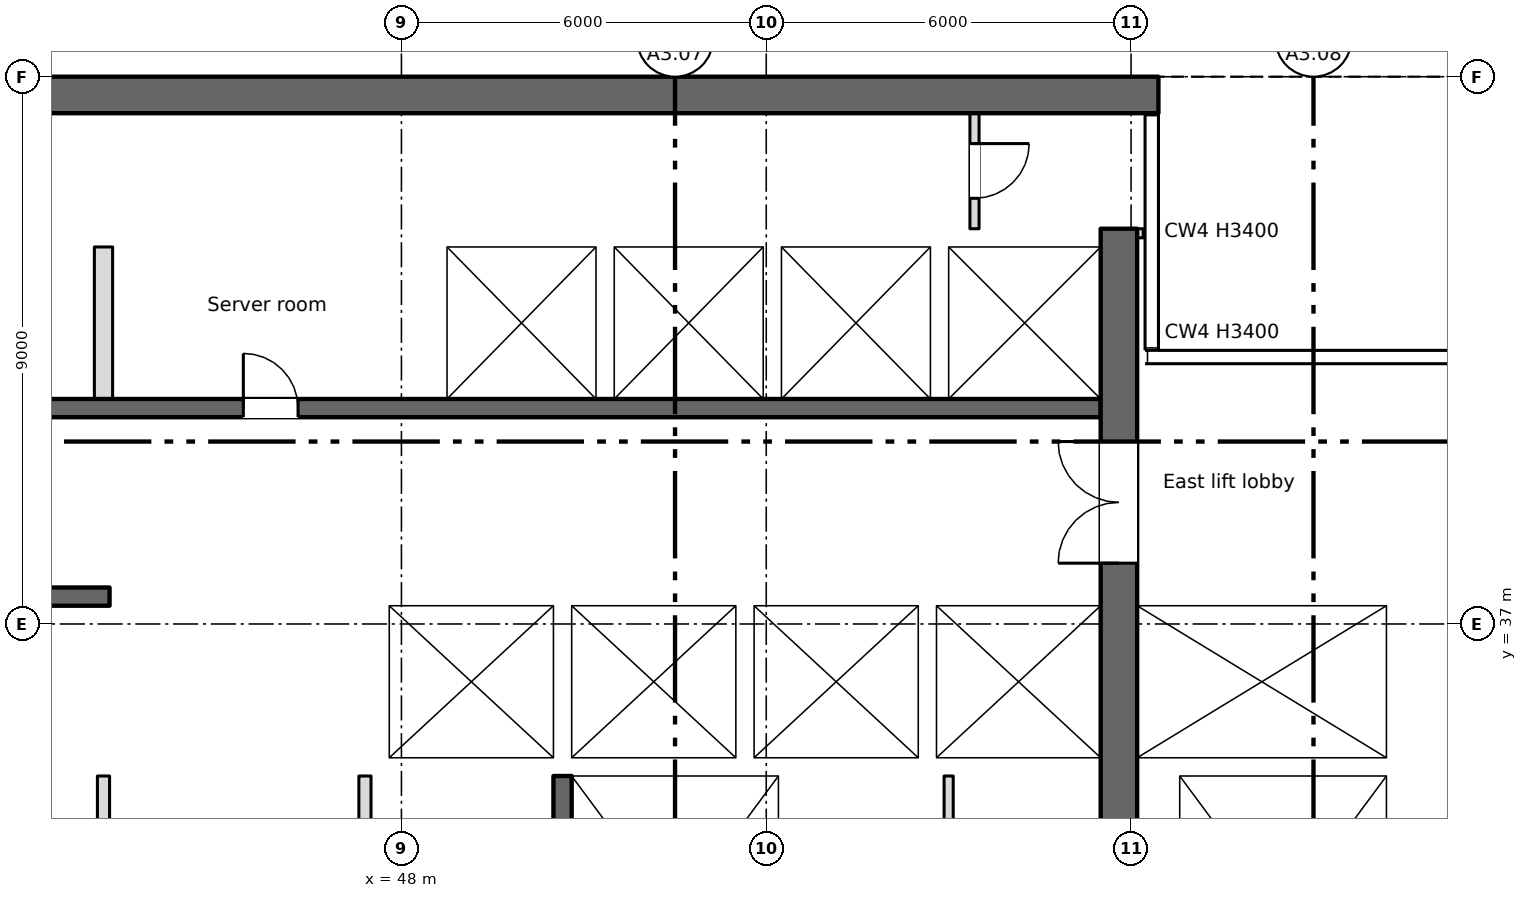
"""IFC4 building model, lengths in metres.
Left out: names, types, materials, properties, quantities, classifications, styles, units other than length and angle.
Written with IfcOpenShell. Run it as: python <this file> out.ifc"""

import sys

from ifc_helpers import new_model, si_unit, direction, frame, frame_2d, origin, place, context, subcontext, project, spatial, rectangle, extrude, element, fill, save


model = new_model("IFC4")
c1 = context("Model", 3, precision=1e-05, world=origin(), true_north=direction((0.0, 1.0)))
c2 = subcontext(c1, "Body", "Model", "MODEL_VIEW")
j1 = project(units=[si_unit("LENGTHUNIT", "METRE"), si_unit("PLANEANGLEUNIT", "RADIAN")], contexts=[c1])
p1 = place(None, origin())
s1 = spatial("IfcSite", under=j1, at=p1, CompositionType="ELEMENT")
p2 = place(p1, origin())
s2 = spatial("IfcBuilding", under=s1, at=p2, CompositionType="ELEMENT")
p3 = place(p2, frame((0.0, 0.0, 243.15)))
s3 = spatial("IfcBuildingStorey", under=s2, at=p3, CompositionType="ELEMENT", Elevation=243.15)
p4 = place(p3, frame((11.55, 45.7, 0.0), z_axis=(0.0, 0.0, 1.0), x_axis=(1.0, 0.0, 0.0)))
e1 = element("IfcWall", 1, at=p4, inside=s3, PredefinedType="SHEAR", context=c2, shape_type="SweptSolid", body=[
    extrude(rectangle(XDim=48.9, YDim=0.6, at=frame_2d((24.45, 0.0))), origin(), (0.0, 0.0, 1.0), 3.4),
])
p5 = place(p4, frame((1.2, 0.0, 0.6)))
e2 = element("IfcOpeningElement", 2, at=p5, cuts=e1, PredefinedType="OPENING", context=c2, shape_type="SweptSolid", body=[
    extrude(rectangle(XDim=0.6, YDim=2.4, at=frame_2d((0.3, 1.2))), frame((0.0, 0.31, 0.0), z_axis=(0.0, -1.0, 0.0), x_axis=(1.0, 0.0, 0.0)), (0.0, 0.0, 1.0), 0.62),
])
p6 = place(p3, frame((64.35, 34.8, 0.0), z_axis=(0.0, 0.0, 1.0), x_axis=(0.0, 1.0, 0.0)))
e3 = element("IfcWall", 3, at=p6, inside=s3, PredefinedType="SHEAR", context=c2, shape_type="SweptSolid", body=[
    extrude(rectangle(XDim=6.45, YDim=0.3, at=frame_2d((3.225, 0.0))), origin(), (0.0, 0.0, 1.0), 3.4),
])
p7 = place(p3, frame((59.8, 28.4, 0.0), z_axis=(0.0, 0.0, 1.0), x_axis=(0.0, 1.0, 0.0)))
e4 = element("IfcWall", 4, at=p7, inside=s3, PredefinedType="SHEAR", context=c2, shape_type="SweptSolid", body=[
    extrude(rectangle(XDim=15.1, YDim=0.6, at=frame_2d((7.55, 0.0))), origin(), (0.0, 0.0, 1.0), 3.4),
])
p8 = place(p7, frame((9.6, 0.0, 0.0)))
e5 = element("IfcOpeningElement", 5, at=p8, cuts=e4, PredefinedType="OPENING", context=c2, shape_type="SweptSolid", body=[
    extrude(rectangle(XDim=2.0, YDim=2.1, at=frame_2d((1.0, 1.05))), frame((0.0, 0.31, 0.0), z_axis=(0.0, -1.0, 0.0), x_axis=(1.0, 0.0, 0.0)), (0.0, 0.0, 1.0), 0.62),
])
p9 = place(p3, frame((50.65, 34.5, 0.0), z_axis=(0.0, 0.0, 1.0), x_axis=(0.0, -1.0, 0.0)))
e6 = element("IfcWall", 6, at=p9, inside=s3, PredefinedType="SHEAR", context=c2, shape_type="SweptSolid", body=[
    extrude(rectangle(XDim=6.1, YDim=0.3, at=frame_2d((3.05, 0.0))), origin(), (0.0, 0.0, 1.0), 3.4),
])
p10 = place(p9, frame((4.95, 0.0, 0.0)))
e7 = element("IfcOpeningElement", 7, at=p10, cuts=e6, PredefinedType="OPENING", context=c2, shape_type="SweptSolid", body=[
    extrude(rectangle(XDim=1.1, YDim=2.1, at=frame_2d((0.55, 1.05))), frame((0.0, 0.16, 0.0), z_axis=(0.0, -1.0, 0.0), x_axis=(1.0, 0.0, 0.0)), (0.0, 0.0, 1.0), 0.32),
])
p11 = place(p3, frame((54.35, 28.4, 0.0), z_axis=(0.0, 0.0, 1.0), x_axis=(0.0, 1.0, 0.0)))
e8 = element("IfcWall", 8, at=p11, inside=s3, PredefinedType="SHEAR", context=c2, shape_type="SweptSolid", body=[
    extrude(rectangle(XDim=6.1, YDim=0.3, at=frame_2d((3.05, 0.0))), origin(), (0.0, 0.0, 1.0), 3.4),
])
p12 = place(p3, frame((60.45, 28.4, 0.0), z_axis=(0.0, 0.0, 1.0), x_axis=(0.0, 1.0, 0.0)))
e9 = element("IfcWall", 9, at=p12, inside=s3, PredefinedType="SHEAR", context=c2, shape_type="SweptSolid", body=[
    extrude(rectangle(XDim=6.1, YDim=0.7, at=frame_2d((3.05, 0.0))), origin(), (0.0, 0.0, 1.0), 3.4),
])
p13 = place(p3, frame((64.35, 28.4, 0.0), z_axis=(0.0, 0.0, 1.0), x_axis=(0.0, 1.0, 0.0)))
e10 = element("IfcWall", 10, at=p13, inside=s3, PredefinedType="SHEAR", context=c2, shape_type="SweptSolid", body=[
    extrude(rectangle(XDim=6.1, YDim=0.3, at=frame_2d((3.05, 0.0))), origin(), (0.0, 0.0, 1.0), 3.4),
])
p14 = place(p3, frame((34.8, 34.65, 0.0), z_axis=(0.0, 0.0, 1.0), x_axis=(1.0, 0.0, 0.0)))
e11 = element("IfcWall", 11, at=p14, inside=s3, PredefinedType="SHEAR", context=c2, shape_type="SweptSolid", body=[
    extrude(rectangle(XDim=8.4, YDim=0.3, at=frame_2d((4.2, 0.0))), origin(), (0.0, 0.0, 1.0), 3.4),
])
p15 = place(p3, frame((47.3, 34.65, 0.0), z_axis=(0.0, 0.0, 1.0), x_axis=(1.0, 0.0, 0.0)))
e12 = element("IfcWall", 12, at=p15, inside=s3, PredefinedType="SHEAR", context=c2, shape_type="SweptSolid", body=[
    extrude(rectangle(XDim=12.2, YDim=0.3, at=frame_2d((6.1, 0.0))), origin(), (0.0, 0.0, 1.0), 3.4),
])
p16 = place(p15, frame((1.3, 0.0, 0.0)))
e13 = element("IfcOpeningElement", 13, at=p16, cuts=e12, PredefinedType="OPENING", context=c2, shape_type="SweptSolid", body=[
    extrude(rectangle(XDim=1.1, YDim=2.1, at=frame_2d((0.55, 1.05))), frame((0.0, 0.16, 0.0), z_axis=(0.0, -1.0, 0.0), x_axis=(1.0, 0.0, 0.0)), (0.0, 0.0, 1.0), 0.32),
])
p17 = place(p3, frame((60.1, 34.65, 0.0), z_axis=(0.0, 0.0, 1.0), x_axis=(1.0, 0.0, 0.0)))
e14 = element("IfcWall", 14, at=p17, inside=s3, PredefinedType="SHEAR", context=c2, shape_type="SweptSolid", body=[
    extrude(rectangle(XDim=4.4, YDim=0.3, at=frame_2d((2.2, 0.0))), origin(), (0.0, 0.0, 1.0), 3.4),
])
p18 = place(p3, frame((43.2, 37.45, 0.0), z_axis=(0.0, 0.0, 1.0), x_axis=(-1.0, 0.0, 0.0)))
e15 = element("IfcWall", 15, at=p18, inside=s3, PredefinedType="SHEAR", context=c2, shape_type="SweptSolid", body=[
    extrude(rectangle(XDim=8.4, YDim=0.3, at=frame_2d((4.2, 0.0))), origin(), (0.0, 0.0, 1.0), 3.4),
])
p19 = place(p18, frame((3.75, 0.0, 0.0)))
e16 = element("IfcOpeningElement", 16, at=p19, cuts=e15, PredefinedType="OPENING", context=c2, shape_type="SweptSolid", body=[
    extrude(rectangle(XDim=0.9, YDim=2.1, at=frame_2d((0.45, 1.05))), frame((0.0, 0.16, 0.0), z_axis=(0.0, -1.0, 0.0), x_axis=(1.0, 0.0, 0.0)), (0.0, 0.0, 1.0), 0.32),
])
p20 = place(p3, frame((47.3, 37.45, 0.0), z_axis=(0.0, 0.0, 1.0), x_axis=(1.0, 0.0, 0.0)))
e17 = element("IfcWall", 17, at=p20, inside=s3, PredefinedType="SHEAR", context=c2, shape_type="SweptSolid", body=[
    extrude(rectangle(XDim=12.2, YDim=0.3, at=frame_2d((6.1, 0.0))), origin(), (0.0, 0.0, 1.0), 3.4),
])
p21 = place(p20, frame((4.3, 0.0, 0.0)))
e18 = element("IfcOpeningElement", 18, at=p21, cuts=e17, PredefinedType="OPENING", context=c2, shape_type="SweptSolid", body=[
    extrude(rectangle(XDim=1.1, YDim=2.1, at=frame_2d((0.55, 1.05))), frame((0.0, 0.16, 0.0), z_axis=(0.0, -1.0, 0.0), x_axis=(1.0, 0.0, 0.0)), (0.0, 0.0, 1.0), 0.32),
])
p22 = place(p20, frame((7.3, 0.0, 0.0)))
e19 = element("IfcOpeningElement", 19, at=p22, cuts=e17, PredefinedType="OPENING", context=c2, shape_type="SweptSolid", body=[
    extrude(rectangle(XDim=1.1, YDim=2.1, at=frame_2d((0.55, 1.05))), frame((0.0, 0.16, 0.0), z_axis=(0.0, -1.0, 0.0), x_axis=(1.0, 0.0, 0.0)), (0.0, 0.0, 1.0), 0.32),
])
p23 = place(p20, frame((10.3, 0.0, 0.0)))
e20 = element("IfcOpeningElement", 20, at=p23, cuts=e17, PredefinedType="OPENING", context=c2, shape_type="SweptSolid", body=[
    extrude(rectangle(XDim=1.1, YDim=2.1, at=frame_2d((0.55, 1.05))), frame((0.0, 0.16, 0.0), z_axis=(0.0, -1.0, 0.0), x_axis=(1.0, 0.0, 0.0)), (0.0, 0.0, 1.0), 0.32),
])
p24 = place(p3, frame((60.1, 37.45, 0.0), z_axis=(0.0, 0.0, 1.0), x_axis=(1.0, 0.0, 0.0)))
e21 = element("IfcWall", 21, at=p24, inside=s3, PredefinedType="SHEAR", context=c2, shape_type="SweptSolid", body=[
    extrude(rectangle(XDim=4.1, YDim=0.3, at=frame_2d((2.05, 0.0))), origin(), (0.0, 0.0, 1.0), 3.4),
])
p25 = place(p24, frame((1.5, 0.0, 0.0)))
e22 = element("IfcOpeningElement", 22, at=p25, cuts=e21, PredefinedType="OPENING", context=c2, shape_type="SweptSolid", body=[
    extrude(rectangle(XDim=1.1, YDim=2.1, at=frame_2d((0.55, 1.05))), frame((0.0, 0.16, 0.0), z_axis=(0.0, -1.0, 0.0), x_axis=(1.0, 0.0, 0.0)), (0.0, 0.0, 1.0), 0.32),
])
p26 = place(p3, frame((43.05, 34.8, 0.0), z_axis=(0.0, 0.0, 1.0), x_axis=(0.0, 1.0, 0.0)))
e23 = element("IfcWall", 23, at=p26, inside=s3, PredefinedType="SHEAR", context=c2, shape_type="SweptSolid", body=[
    extrude(rectangle(XDim=2.5, YDim=0.3, at=frame_2d((1.25, 0.0))), origin(), (0.0, 0.0, 1.0), 3.4),
])
p27 = place(p3, frame((47.55, 34.8, 0.0), z_axis=(0.0, 0.0, 1.0), x_axis=(0.0, 1.0, 0.0)))
e24 = element("IfcWall", 24, at=p27, inside=s3, PredefinedType="SHEAR", context=c2, shape_type="SweptSolid", body=[
    extrude(rectangle(XDim=2.5, YDim=0.5, at=frame_2d((1.25, 0.0))), origin(), (0.0, 0.0, 1.0), 3.4),
])
p28 = place(p3, frame((50.65, 34.8, 0.0), z_axis=(0.0, 0.0, 1.0), x_axis=(0.0, 1.0, 0.0)))
e25 = element("IfcWall", 25, at=p28, inside=s3, PredefinedType="SHEAR", context=c2, shape_type="SweptSolid", body=[
    extrude(rectangle(XDim=2.5, YDim=0.3, at=frame_2d((1.25, 0.0))), origin(), (0.0, 0.0, 1.0), 3.4),
])
p29 = place(p3, frame((18.5, 40.55, 0.0), z_axis=(0.0, 0.0, 1.0), x_axis=(1.0, 0.0, 0.0)))
e26 = element("IfcWall", 26, at=p29, inside=s3, PredefinedType="SHEAR", context=c2, shape_type="SweptSolid", body=[
    extrude(rectangle(XDim=41.0, YDim=0.3, at=frame_2d((20.5, 0.0))), origin(), (0.0, 0.0, 1.0), 3.4),
])
p30 = place(p29, frame((2.15, 0.0, 0.0)))
e27 = element("IfcOpeningElement", 27, at=p30, cuts=e26, PredefinedType="OPENING", context=c2, shape_type="SweptSolid", body=[
    extrude(rectangle(XDim=0.9, YDim=2.1, at=frame_2d((0.45, 1.05))), frame((0.0, 0.16, 0.0), z_axis=(0.0, -1.0, 0.0), x_axis=(1.0, 0.0, 0.0)), (0.0, 0.0, 1.0), 0.32),
])
p31 = place(p29, frame((15.9, 0.0, 0.0)))
e28 = element("IfcOpeningElement", 28, at=p31, cuts=e26, PredefinedType="OPENING", context=c2, shape_type="SweptSolid", body=[
    extrude(rectangle(XDim=0.9, YDim=2.1, at=frame_2d((0.45, 1.05))), frame((0.0, 0.16, 0.0), z_axis=(0.0, -1.0, 0.0), x_axis=(1.0, 0.0, 0.0)), (0.0, 0.0, 1.0), 0.32),
])
p32 = place(p29, frame((21.4, 0.0, 0.0)))
e29 = element("IfcOpeningElement", 29, at=p32, cuts=e26, PredefinedType="OPENING", context=c2, shape_type="SweptSolid", body=[
    extrude(rectangle(XDim=0.9, YDim=2.1, at=frame_2d((0.45, 1.05))), frame((0.0, 0.16, 0.0), z_axis=(0.0, -1.0, 0.0), x_axis=(1.0, 0.0, 0.0)), (0.0, 0.0, 1.0), 0.32),
])
p33 = place(p29, frame((26.9, 0.0, 0.0)))
e30 = element("IfcOpeningElement", 30, at=p33, cuts=e26, PredefinedType="OPENING", context=c2, shape_type="SweptSolid", body=[
    extrude(rectangle(XDim=0.9, YDim=2.1, at=frame_2d((0.45, 1.05))), frame((0.0, 0.16, 0.0), z_axis=(0.0, -1.0, 0.0), x_axis=(1.0, 0.0, 0.0)), (0.0, 0.0, 1.0), 0.32),
])
p34 = place(p29, frame((6.175, 0.0, 0.0)))
e31 = element("IfcOpeningElement", 31, at=p34, cuts=e26, PredefinedType="OPENING", context=c2, shape_type="SweptSolid", body=[
    extrude(rectangle(XDim=1.1, YDim=2.1, at=frame_2d((0.55, 1.05))), frame((0.0, 0.16, 0.0), z_axis=(0.0, -1.0, 0.0), x_axis=(1.0, 0.0, 0.0)), (0.0, 0.0, 1.0), 0.32),
])
p35 = place(p29, frame((8.925, 0.0, 0.0)))
e32 = element("IfcOpeningElement", 32, at=p35, cuts=e26, PredefinedType="OPENING", context=c2, shape_type="SweptSolid", body=[
    extrude(rectangle(XDim=1.1, YDim=2.1, at=frame_2d((0.55, 1.05))), frame((0.0, 0.16, 0.0), z_axis=(0.0, -1.0, 0.0), x_axis=(1.0, 0.0, 0.0)), (0.0, 0.0, 1.0), 0.32),
])
p36 = place(p29, frame((11.675, 0.0, 0.0)))
e33 = element("IfcOpeningElement", 33, at=p36, cuts=e26, PredefinedType="OPENING", context=c2, shape_type="SweptSolid", body=[
    extrude(rectangle(XDim=1.1, YDim=2.1, at=frame_2d((0.55, 1.05))), frame((0.0, 0.16, 0.0), z_axis=(0.0, -1.0, 0.0), x_axis=(1.0, 0.0, 0.0)), (0.0, 0.0, 1.0), 0.32),
])
p37 = place(p29, frame((30.925, 0.0, 0.0)))
e34 = element("IfcOpeningElement", 34, at=p37, cuts=e26, PredefinedType="OPENING", context=c2, shape_type="SweptSolid", body=[
    extrude(rectangle(XDim=1.1, YDim=2.1, at=frame_2d((0.55, 1.05))), frame((0.0, 0.16, 0.0), z_axis=(0.0, -1.0, 0.0), x_axis=(1.0, 0.0, 0.0)), (0.0, 0.0, 1.0), 0.32),
])
p38 = place(p29, frame((33.675, 0.0, 0.0)))
e35 = element("IfcOpeningElement", 35, at=p38, cuts=e26, PredefinedType="OPENING", context=c2, shape_type="SweptSolid", body=[
    extrude(rectangle(XDim=1.1, YDim=2.1, at=frame_2d((0.55, 1.05))), frame((0.0, 0.16, 0.0), z_axis=(0.0, -1.0, 0.0), x_axis=(1.0, 0.0, 0.0)), (0.0, 0.0, 1.0), 0.32),
])
p39 = place(p29, frame((36.375, 0.0, 0.0)))
e36 = element("IfcOpeningElement", 36, at=p39, cuts=e26, PredefinedType="OPENING", context=c2, shape_type="SweptSolid", body=[
    extrude(rectangle(XDim=1.2, YDim=2.1, at=frame_2d((0.6, 1.05))), frame((0.0, 0.16, 0.0), z_axis=(0.0, -1.0, 0.0), x_axis=(1.0, 0.0, 0.0)), (0.0, 0.0, 1.0), 0.32),
])
p40 = place(p29, frame((39.15, 0.0, 0.0)))
e37 = element("IfcOpeningElement", 37, at=p40, cuts=e26, PredefinedType="OPENING", context=c2, shape_type="SweptSolid", body=[
    extrude(rectangle(XDim=1.2, YDim=2.1, at=frame_2d((0.6, 1.05))), frame((0.0, 0.16, 0.0), z_axis=(0.0, -1.0, 0.0), x_axis=(1.0, 0.0, 0.0)), (0.0, 0.0, 1.0), 0.32),
])
p41 = place(p3, frame((18.5, 43.35, 0.0), z_axis=(0.0, 0.0, 1.0), x_axis=(1.0, 0.0, 0.0)))
e38 = element("IfcWall", 38, at=p41, inside=s3, PredefinedType="SHEAR", context=c2, shape_type="SweptSolid", body=[
    extrude(rectangle(XDim=41.0, YDim=0.3, at=frame_2d((20.5, 0.0))), origin(), (0.0, 0.0, 1.0), 3.4),
])
for number, where, z_axis, x_axis in (
    (39, (53.65, 34.8, 0.0), (0.0, 0.0, 1.0), (0.0, 1.0, 0.0)),
    (40, (56.65, 34.8, 0.0), (0.0, 0.0, 1.0), (0.0, 1.0, 0.0)),
    (41, (48.6, 40.7, 0.0), (0.0, 0.0, 1.0), (0.0, 1.0, 0.0)),
    (42, (51.35, 40.7, 0.0), (0.0, 0.0, 1.0), (0.0, 1.0, 0.0)),
    (43, (54.1, 40.7, 0.0), (0.0, 0.0, 1.0), (0.0, 1.0, 0.0)),
    (44, (56.85, 40.7, 0.0), (0.0, 0.0, 1.0), (0.0, 1.0, 0.0)),
):
    element("IfcWall", number, at=place(p3, frame(where, z_axis=z_axis, x_axis=x_axis)), inside=s3, PredefinedType="SHEAR", context=c2, shape_type="SweptSolid", body=[
        extrude(rectangle(XDim=2.5, YDim=0.3, at=frame_2d((1.25, 0.0))), origin(), (0.0, 0.0, 1.0), 3.4),
    ])
for number, where, z_axis, x_axis in (
    (45, (43.1, 28.4, 0.0), (0.0, 0.0, 1.0), (0.0, 1.0, 0.0)),
    (46, (47.4, 28.4, 0.0), (0.0, 0.0, 1.0), (0.0, 1.0, 0.0)),
):
    element("IfcWall", number, at=place(p3, frame(where, z_axis=z_axis, x_axis=x_axis)), inside=s3, PredefinedType="PARTITIONING", context=c2, shape_type="SweptSolid", body=[
        extrude(rectangle(XDim=6.1, YDim=0.2, at=frame_2d((3.05, 0.0))), origin(), (0.0, 0.0, 1.0), 3.4),
    ])
p42 = place(p3, frame((57.0, 28.4, 0.0), z_axis=(0.0, 0.0, 1.0), x_axis=(0.0, 1.0, 0.0)))
e47 = element("IfcWall", 47, at=p42, inside=s3, PredefinedType="PARTITIONING", context=c2, shape_type="SweptSolid", body=[
    extrude(rectangle(XDim=6.1, YDim=0.15, at=frame_2d((3.05, 0.0))), origin(), (0.0, 0.0, 1.0), 3.4),
])
p43 = place(p3, frame((57.425, 45.4, 0.0), z_axis=(0.0, 0.0, 1.0), x_axis=(0.0, -1.0, 0.0)))
e48 = element("IfcWall", 48, at=p43, inside=s3, PredefinedType="PARTITIONING", context=c2, shape_type="SweptSolid", body=[
    extrude(rectangle(XDim=1.9, YDim=0.15, at=frame_2d((0.95, 0.0))), origin(), (0.0, 0.0, 1.0), 3.4),
])
p44 = place(p43, frame((0.5, 0.0, 0.0)))
e49 = element("IfcOpeningElement", 49, at=p44, cuts=e48, PredefinedType="OPENING", context=c2, shape_type="SweptSolid", body=[
    extrude(rectangle(XDim=0.9, YDim=2.1, at=frame_2d((0.45, 1.05))), frame((0.0, 0.085, 0.0), z_axis=(0.0, -1.0, 0.0), x_axis=(1.0, 0.0, 0.0)), (0.0, 0.0, 1.0), 0.17),
])
p45 = place(p3, frame((60.15, 43.35, 0.0), z_axis=(0.0, 0.0, 1.0), x_axis=(0.0, 1.0, 0.0)))
e50 = element("IfcWall", 50, at=p45, inside=s3, PredefinedType="PARTITIONING", context=c2, shape_type="SweptSolid", body=[
    extrude(rectangle(XDim=0.15, YDim=0.1, at=frame_2d((0.075, 0.0))), origin(), (0.0, 0.0, 1.0), 3.4),
])
p46 = place(p3, frame((43.1, 40.7, 0.0), z_axis=(0.0, 0.0, 1.0), x_axis=(0.0, 1.0, 0.0)))
e51 = element("IfcWall", 51, at=p46, inside=s3, PredefinedType="PARTITIONING", context=c2, shape_type="SweptSolid", body=[
    extrude(rectangle(XDim=2.5, YDim=0.3, at=frame_2d((1.25, 0.0))), origin(), (0.0, 0.0, 1.0), 3.4),
])
p47 = place(p44, origin())
e52 = element("IfcDoor", 52, at=p47, inside=s3, OperationType="SINGLE_SWING_LEFT", PredefinedType="DOOR", context=c2, shape_type="SweptSolid", body=[
    extrude(rectangle(XDim=0.9, YDim=2.1, at=frame_2d((0.45, 1.05))), frame((0.0, 0.025, 0.0), z_axis=(0.0, -1.0, 0.0), x_axis=(1.0, 0.0, 0.0)), (0.0, 0.0, 1.0), 0.05),
])
fill(e49, e52)
p48 = place(p33, origin())
e53 = element("IfcDoor", 53, at=p48, inside=s3, OperationType="SINGLE_SWING_LEFT", PredefinedType="DOOR", context=c2, shape_type="SweptSolid", body=[
    extrude(rectangle(XDim=0.9, YDim=2.1, at=frame_2d((0.45, 1.05))), frame((0.0, 0.025, 0.0), z_axis=(0.0, -1.0, 0.0), x_axis=(1.0, 0.0, 0.0)), (0.0, 0.0, 1.0), 0.05),
])
fill(e30, e53)
p49 = place(p21, origin())
e54 = element("IfcDoor", 54, at=p49, inside=s3, OperationType="SLIDING_TO_LEFT", PredefinedType="DOOR", context=c2, shape_type="SweptSolid", body=[
    extrude(rectangle(XDim=1.1, YDim=2.1, at=frame_2d((0.55, 1.05))), frame((0.0, 0.025, 0.0), z_axis=(0.0, -1.0, 0.0), x_axis=(1.0, 0.0, 0.0)), (0.0, 0.0, 1.0), 0.05),
])
fill(e18, e54)
p50 = place(p22, origin())
e55 = element("IfcDoor", 55, at=p50, inside=s3, OperationType="SLIDING_TO_LEFT", PredefinedType="DOOR", context=c2, shape_type="SweptSolid", body=[
    extrude(rectangle(XDim=1.1, YDim=2.1, at=frame_2d((0.55, 1.05))), frame((0.0, 0.025, 0.0), z_axis=(0.0, -1.0, 0.0), x_axis=(1.0, 0.0, 0.0)), (0.0, 0.0, 1.0), 0.05),
])
fill(e19, e55)
p51 = place(p23, origin())
e56 = element("IfcDoor", 56, at=p51, inside=s3, OperationType="SLIDING_TO_LEFT", PredefinedType="DOOR", context=c2, shape_type="SweptSolid", body=[
    extrude(rectangle(XDim=1.1, YDim=2.1, at=frame_2d((0.55, 1.05))), frame((0.0, 0.025, 0.0), z_axis=(0.0, -1.0, 0.0), x_axis=(1.0, 0.0, 0.0)), (0.0, 0.0, 1.0), 0.05),
])
fill(e20, e56)
p52 = place(p37, origin())
e57 = element("IfcDoor", 57, at=p52, inside=s3, OperationType="SLIDING_TO_LEFT", PredefinedType="DOOR", context=c2, shape_type="SweptSolid", body=[
    extrude(rectangle(XDim=1.1, YDim=2.1, at=frame_2d((0.55, 1.05))), frame((0.0, 0.025, 0.0), z_axis=(0.0, -1.0, 0.0), x_axis=(1.0, 0.0, 0.0)), (0.0, 0.0, 1.0), 0.05),
])
fill(e34, e57)
p53 = place(p38, origin())
e58 = element("IfcDoor", 58, at=p53, inside=s3, OperationType="SLIDING_TO_LEFT", PredefinedType="DOOR", context=c2, shape_type="SweptSolid", body=[
    extrude(rectangle(XDim=1.1, YDim=2.1, at=frame_2d((0.55, 1.05))), frame((0.0, 0.025, 0.0), z_axis=(0.0, -1.0, 0.0), x_axis=(1.0, 0.0, 0.0)), (0.0, 0.0, 1.0), 0.05),
])
fill(e35, e58)
p54 = place(p39, origin())
e59 = element("IfcDoor", 59, at=p54, inside=s3, OperationType="SLIDING_TO_LEFT", PredefinedType="DOOR", context=c2, shape_type="SweptSolid", body=[
    extrude(rectangle(XDim=1.2, YDim=2.1, at=frame_2d((0.6, 1.05))), frame((0.0, 0.025, 0.0), z_axis=(0.0, -1.0, 0.0), x_axis=(1.0, 0.0, 0.0)), (0.0, 0.0, 1.0), 0.05),
])
fill(e36, e59)
p55 = place(p40, origin())
e60 = element("IfcDoor", 60, at=p55, inside=s3, OperationType="SLIDING_TO_LEFT", PredefinedType="DOOR", context=c2, shape_type="SweptSolid", body=[
    extrude(rectangle(XDim=1.2, YDim=2.1, at=frame_2d((0.6, 1.05))), frame((0.0, 0.025, 0.0), z_axis=(0.0, -1.0, 0.0), x_axis=(1.0, 0.0, 0.0)), (0.0, 0.0, 1.0), 0.05),
])
fill(e37, e60)
p56 = place(p25, origin())
e61 = element("IfcDoor", 61, at=p56, inside=s3, OperationType="SLIDING_TO_LEFT", PredefinedType="DOOR", context=c2, shape_type="SweptSolid", body=[
    extrude(rectangle(XDim=1.1, YDim=2.1, at=frame_2d((0.55, 1.05))), frame((0.0, 0.025, 0.0), z_axis=(0.0, -1.0, 0.0), x_axis=(1.0, 0.0, 0.0)), (0.0, 0.0, 1.0), 0.05),
])
fill(e22, e61)
p57 = place(p16, origin())
e62 = element("IfcDoor", 62, at=p57, inside=s3, OperationType="SLIDING_TO_LEFT", PredefinedType="DOOR", context=c2, shape_type="SweptSolid", body=[
    extrude(rectangle(XDim=1.1, YDim=2.1, at=frame_2d((0.55, 1.05))), frame((0.0, 0.025, 0.0), z_axis=(0.0, -1.0, 0.0), x_axis=(1.0, 0.0, 0.0)), (0.0, 0.0, 1.0), 0.05),
])
fill(e13, e62)
p58 = place(p8, origin())
e63 = element("IfcDoor", 63, at=p58, inside=s3, OperationType="DOUBLE_DOOR_SINGLE_SWING", PredefinedType="DOOR", context=c2, shape_type="SweptSolid", body=[
    extrude(rectangle(XDim=2.0, YDim=2.1, at=frame_2d((1.0, 1.05))), frame((0.0, 0.025, 0.0), z_axis=(0.0, -1.0, 0.0), x_axis=(1.0, 0.0, 0.0)), (0.0, 0.0, 1.0), 0.05),
])
fill(e5, e63)
save(model, sys.argv[1])
